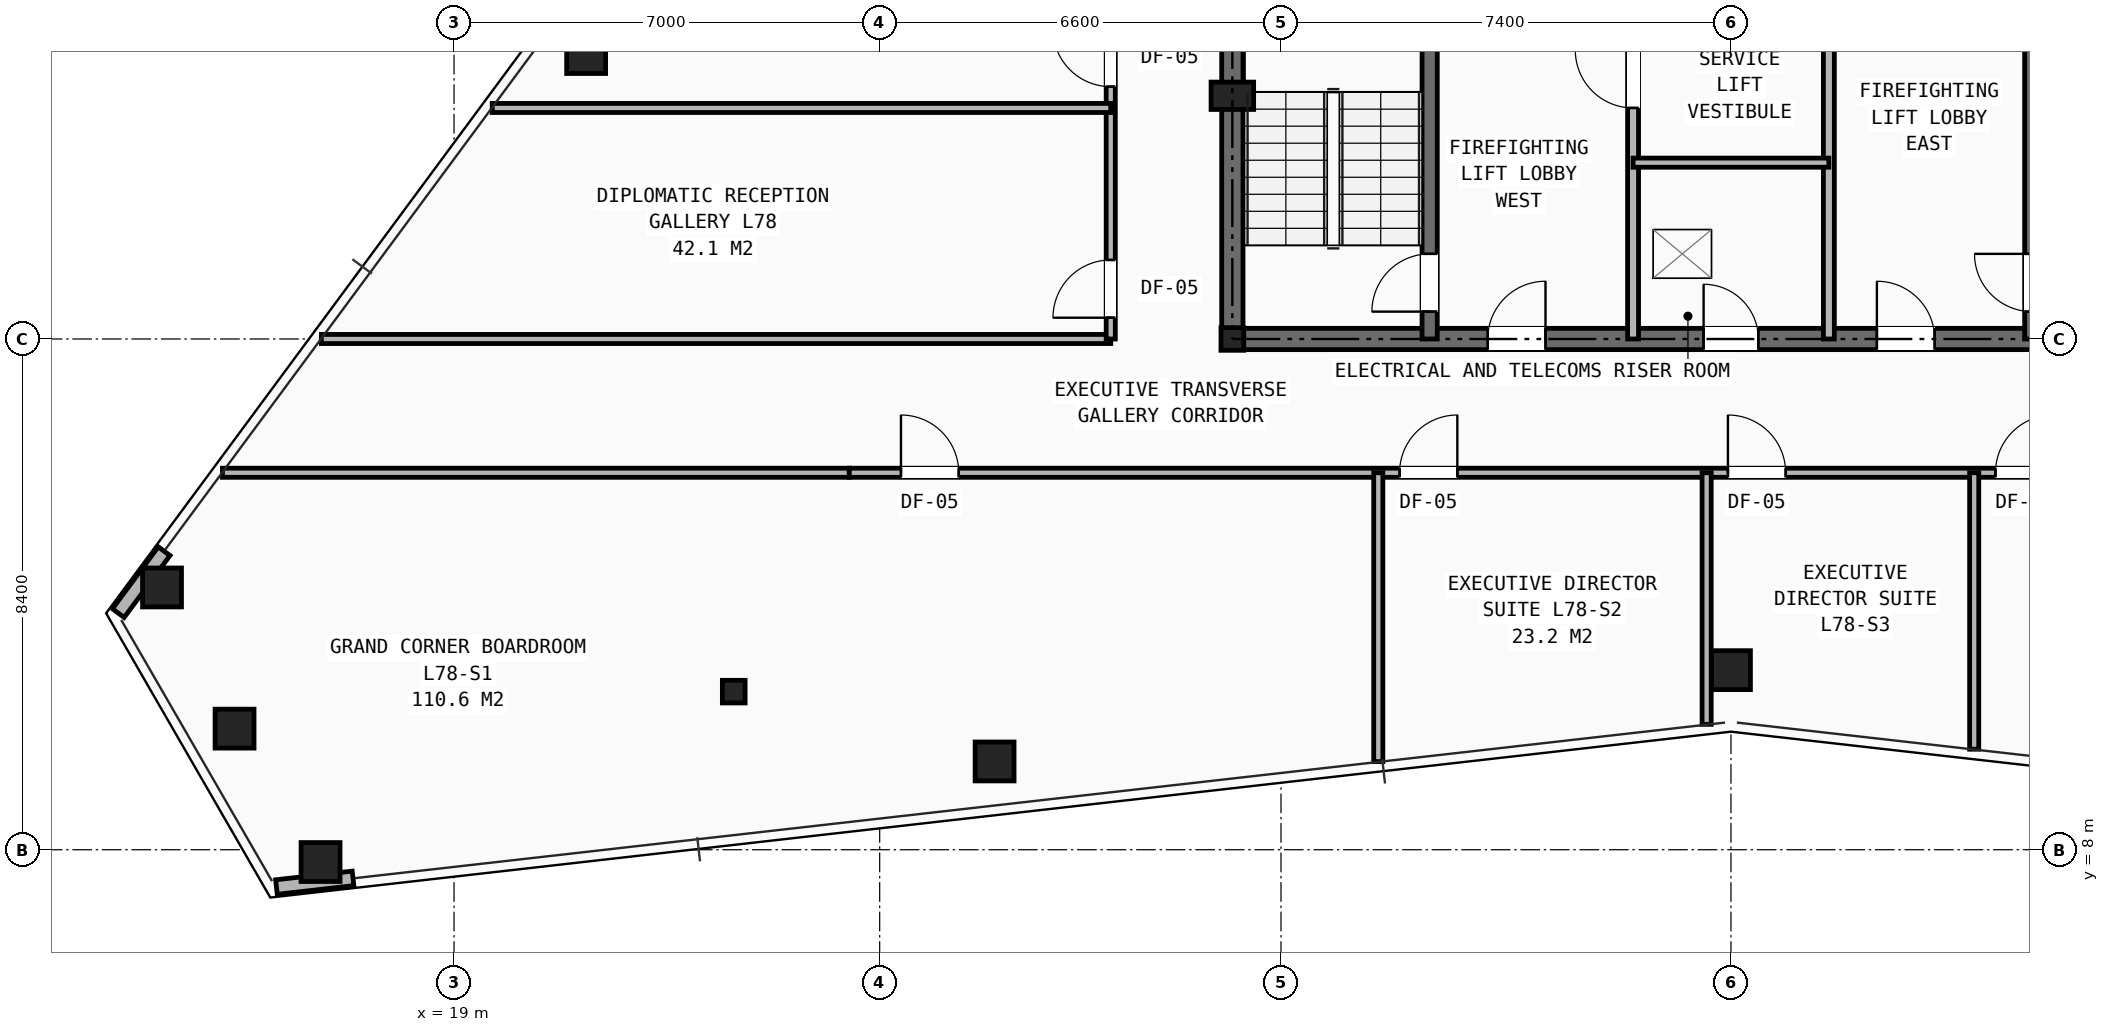
"""IFC4 building model, lengths in metres.
Left out: names, types, materials, properties, quantities, classifications, styles, units other than length and angle.
Written with IfcOpenShell. Run it as: python <this file> out.ifc"""

import sys

from ifc_helpers import new_model, si_unit, direction, frame, frame_2d, origin, origin_2d, place, context, subcontext, project, spatial, rectangle, hollow_rectangle, i_section, extrude, element, fill, save


model = new_model("IFC4")
c1 = context("Model", 3, precision=1e-05, world=origin(), true_north=direction((0.0, 1.0)))
c2 = subcontext(c1, "Body", "Model", "MODEL_VIEW")
j1 = project(units=[si_unit("LENGTHUNIT", "METRE"), si_unit("PLANEANGLEUNIT", "RADIAN")], contexts=[c1])
p1 = place(None, origin())
s1 = spatial("IfcSite", under=j1, at=p1, CompositionType="ELEMENT")
p2 = place(p1, origin())
s2 = spatial("IfcBuilding", under=s1, at=p2, CompositionType="ELEMENT")
p3 = place(p2, frame((0.0, 0.0, 276.0)))
s3 = spatial("IfcBuildingStorey", under=s2, at=p3, CompositionType="ELEMENT", Elevation=276.0)
for number, where, z_axis, x_axis in (
    (1, (31.8, 16.4, 0.0), (0.0, 0.0, 1.0), (1.0, 0.0, 0.0)),
    (2, (23.6, 10.6, 0.0), (0.0, 0.0, 1.0), (1.0, 0.0, 0.0)),
):
    element("IfcColumn", number, at=place(p3, frame(where, z_axis=z_axis, x_axis=x_axis)), inside=s3, PredefinedType="COLUMN", context=c2, shape_type="SweptSolid", body=[
        extrude(i_section(OverallWidth=0.374, OverallDepth=0.372, WebThickness=0.016, FlangeThickness=0.026, at=origin_2d()), origin(), (0.0, 0.0, 1.0), 3.5),
    ])
p4 = place(p3, frame((31.8, 20.4, 0.0), z_axis=(0.0, 0.0, 1.0), x_axis=(1.0, 0.0, 0.0)))
e3 = element("IfcColumn", 3, at=p4, inside=s3, PredefinedType="PILASTER", context=c2, shape_type="SweptSolid", body=[
    extrude(rectangle(XDim=0.7, YDim=0.45, at=origin_2d()), origin(), (0.0, 0.0, 1.0), 3.5),
])
for number, where, z_axis, x_axis in (
    (4, (21.173, 21.086, 0.0), (0.0, 0.0, 1.0), (1.0, 0.0, 0.0)),
    (5, (14.198, 12.313, 0.0), (0.0, 0.0, 1.0), (1.0, 0.0, 0.0)),
    (6, (15.39, 9.992, 0.0), (0.0, 0.0, 1.0), (1.0, 0.0, 0.0)),
    (7, (16.805, 7.798, 0.0), (0.0, 0.0, 1.0), (1.0, 0.0, 0.0)),
    (8, (27.89, 9.452, 0.0), (0.0, 0.0, 1.0), (1.0, 0.0, 0.0)),
    (9, (40.0, 10.953, 0.0), (0.0, 0.0, 1.0), (1.0, 0.0, 0.0)),
):
    element("IfcColumn", number, at=place(p3, frame(where, z_axis=z_axis, x_axis=x_axis)), inside=s3, PredefinedType="COLUMN", context=c2, shape_type="SweptSolid", body=[
        extrude(hollow_rectangle(XDim=0.64, YDim=0.64, WallThickness=0.045, at=origin_2d()), origin(), (0.0, 0.0, 1.0), 3.5),
    ])
p5 = place(p3, frame((14.232, 12.91, 0.0), z_axis=(0.0, 0.0, 1.0), x_axis=(-0.594499388503, -0.804096062091, 0.0)))
e10 = element("IfcWall", 10, at=p5, inside=s3, PredefinedType="SHEAR", context=c2, shape_type="SweptSolid", body=[
    extrude(rectangle(XDim=1.267, YDim=0.24, at=frame_2d((0.634, 0.0))), origin(), (0.0, 0.0, 1.0), 2.623),
])
p6 = place(p3, frame((16.079, 7.386, 0.0), z_axis=(0.0, 0.0, 1.0), x_axis=(0.993610655419, 0.11286215237, 0.0)))
e11 = element("IfcWall", 11, at=p6, inside=s3, PredefinedType="SHEAR", context=c2, shape_type="SweptSolid", body=[
    extrude(rectangle(XDim=1.268, YDim=0.24, at=frame_2d((0.634, 0.0))), origin(), (0.0, 0.0, 1.0), 2.623),
])
p7 = place(p3, frame((31.8, 16.4, 0.0), z_axis=(0.0, 0.0, 1.0), x_axis=(1.0, 0.0, 0.0)))
e12 = element("IfcWall", 12, at=p7, inside=s3, PredefinedType="SHEAR", context=c2, shape_type="SweptSolid", body=[
    extrude(rectangle(XDim=16.4, YDim=0.35, at=frame_2d((8.2, 0.0))), origin(), (0.0, 0.0, 1.0), 3.25),
])
p8 = place(p7, frame((7.75, 0.0, 0.0)))
e13 = element("IfcOpeningElement", 13, at=p8, cuts=e12, PredefinedType="OPENING", context=c2, shape_type="SweptSolid", body=[
    extrude(rectangle(XDim=0.9, YDim=2.1, at=frame_2d((0.45, 1.05))), frame((0.0, 0.185, 0.0), z_axis=(0.0, -1.0, 0.0), x_axis=(1.0, 0.0, 0.0)), (0.0, 0.0, 1.0), 0.37),
])
p9 = place(p7, frame((4.2, 0.0, 0.0)))
e14 = element("IfcOpeningElement", 14, at=p9, cuts=e12, PredefinedType="OPENING", context=c2, shape_type="SweptSolid", body=[
    extrude(rectangle(XDim=0.95, YDim=2.1, at=frame_2d((0.475, 1.05))), frame((0.0, 0.185, 0.0), z_axis=(0.0, -1.0, 0.0), x_axis=(1.0, 0.0, 0.0)), (0.0, 0.0, 1.0), 0.37),
])
p10 = place(p7, frame((10.6, 0.0, 0.0)))
e15 = element("IfcOpeningElement", 15, at=p10, cuts=e12, PredefinedType="OPENING", context=c2, shape_type="SweptSolid", body=[
    extrude(rectangle(XDim=0.95, YDim=2.1, at=frame_2d((0.475, 1.05))), frame((0.0, 0.185, 0.0), z_axis=(0.0, -1.0, 0.0), x_axis=(1.0, 0.0, 0.0)), (0.0, 0.0, 1.0), 0.37),
])
p11 = place(p3, frame((31.8, 16.4, 0.0), z_axis=(0.0, 0.0, 1.0), x_axis=(0.0, 1.0, 0.0)))
e16 = element("IfcWall", 16, at=p11, inside=s3, PredefinedType="SHEAR", context=c2, shape_type="SweptSolid", body=[
    extrude(rectangle(XDim=14.8, YDim=0.35, at=frame_2d((7.4, 0.0))), origin(), (0.0, 0.0, 1.0), 3.25),
])
p12 = place(p11, frame((11.0, 0.0, 0.0)))
e17 = element("IfcOpeningElement", 17, at=p12, cuts=e16, PredefinedType="OPENING", context=c2, shape_type="SweptSolid", body=[
    extrude(rectangle(XDim=1.1, YDim=2.15, at=frame_2d((0.55, 1.075))), frame((0.0, 0.185, 0.0), z_axis=(0.0, -1.0, 0.0), x_axis=(1.0, 0.0, 0.0)), (0.0, 0.0, 1.0), 0.37),
])
p13 = place(p3, frame((35.045, 16.4, 0.0), z_axis=(0.0, 0.0, 1.0), x_axis=(0.0, 1.0, 0.0)))
e18 = element("IfcWall", 18, at=p13, inside=s3, PredefinedType="SHEAR", context=c2, shape_type="SweptSolid", body=[
    extrude(rectangle(XDim=8.4, YDim=0.25, at=frame_2d((4.2, 0.0))), origin(), (0.0, 0.0, 1.0), 3.25),
])
p14 = place(p13, frame((0.45, 0.0, 0.0)))
e19 = element("IfcOpeningElement", 19, at=p14, cuts=e18, PredefinedType="OPENING", context=c2, shape_type="SweptSolid", body=[
    extrude(rectangle(XDim=0.95, YDim=2.1, at=frame_2d((0.475, 1.05))), frame((0.0, 0.135, 0.0), z_axis=(0.0, -1.0, 0.0), x_axis=(1.0, 0.0, 0.0)), (0.0, 0.0, 1.0), 0.27),
])
p15 = place(p3, frame((44.955, 16.4, 0.0), z_axis=(0.0, 0.0, 1.0), x_axis=(0.0, 1.0, 0.0)))
e20 = element("IfcWall", 20, at=p15, inside=s3, PredefinedType="SHEAR", context=c2, shape_type="SweptSolid", body=[
    extrude(rectangle(XDim=8.4, YDim=0.25, at=frame_2d((4.2, 0.0))), origin(), (0.0, 0.0, 1.0), 3.25),
])
p16 = place(p15, frame((0.45, 0.0, 0.0)))
e21 = element("IfcOpeningElement", 21, at=p16, cuts=e20, PredefinedType="OPENING", context=c2, shape_type="SweptSolid", body=[
    extrude(rectangle(XDim=0.95, YDim=2.1, at=frame_2d((0.475, 1.05))), frame((0.0, 0.135, 0.0), z_axis=(0.0, -1.0, 0.0), x_axis=(1.0, 0.0, 0.0)), (0.0, 0.0, 1.0), 0.27),
])
p17 = place(p3, frame((38.39, 16.4, 0.0), z_axis=(0.0, 0.0, 1.0), x_axis=(0.0, 1.0, 0.0)))
e22 = element("IfcWall", 22, at=p17, inside=s3, PredefinedType="PARTITIONING", context=c2, shape_type="SweptSolid", body=[
    extrude(rectangle(XDim=8.4, YDim=0.18, at=frame_2d((4.2, 0.0))), origin(), (0.0, 0.0, 1.0), 2.705),
])
p18 = place(p17, frame((3.8, 0.0, 0.0)))
e23 = element("IfcOpeningElement", 23, at=p18, cuts=e22, PredefinedType="OPENING", context=c2, shape_type="SweptSolid", body=[
    extrude(rectangle(XDim=0.95, YDim=2.1, at=frame_2d((0.475, 1.05))), frame((0.0, 0.1, 0.0), z_axis=(0.0, -1.0, 0.0), x_axis=(1.0, 0.0, 0.0)), (0.0, 0.0, 1.0), 0.2),
])
p19 = place(p3, frame((41.61, 16.4, 0.0), z_axis=(0.0, 0.0, 1.0), x_axis=(0.0, 1.0, 0.0)))
e24 = element("IfcWall", 24, at=p19, inside=s3, PredefinedType="PARTITIONING", context=c2, shape_type="SweptSolid", body=[
    extrude(rectangle(XDim=8.4, YDim=0.18, at=frame_2d((4.2, 0.0))), origin(), (0.0, 0.0, 1.0), 2.705),
])
p20 = place(p3, frame((38.39, 19.3, 0.0), z_axis=(0.0, 0.0, 1.0), x_axis=(1.0, 0.0, 0.0)))
e25 = element("IfcWall", 25, at=p20, inside=s3, PredefinedType="PARTITIONING", context=c2, shape_type="SweptSolid", body=[
    extrude(rectangle(XDim=3.22, YDim=0.15, at=frame_2d((1.61, 0.0))), origin(), (0.0, 0.0, 1.0), 3.25),
])
p21 = place(p3, frame((15.192, 14.2, 0.0), z_axis=(0.0, 0.0, 1.0), x_axis=(1.0, 0.0, 0.0)))
e26 = element("IfcWall", 26, at=p21, inside=s3, PredefinedType="PARTITIONING", context=c2, shape_type="SweptSolid", body=[
    extrude(rectangle(XDim=10.308, YDim=0.15, at=frame_2d((5.154, 0.0))), origin(), (0.0, 0.0, 1.0), 2.292),
])
p22 = place(p3, frame((16.818, 16.4, 0.0), z_axis=(0.0, 0.0, 1.0), x_axis=(1.0, 0.0, 0.0)))
e27 = element("IfcWall", 27, at=p22, inside=s3, PredefinedType="PARTITIONING", context=c2, shape_type="SweptSolid", body=[
    extrude(rectangle(XDim=12.982, YDim=0.15, at=frame_2d((6.491, 0.0))), origin(), (0.0, 0.0, 1.0), 2.292),
])
p23 = place(p3, frame((29.8, 16.4, 0.0), z_axis=(0.0, 0.0, 1.0), x_axis=(0.0, 1.0, 0.0)))
e28 = element("IfcWall", 28, at=p23, inside=s3, PredefinedType="PARTITIONING", context=c2, shape_type="SweptSolid", body=[
    extrude(rectangle(XDim=19.3, YDim=0.15, at=frame_2d((9.65, 0.0))), origin(), (0.0, 0.0, 1.0), 2.292),
])
p24 = place(p23, frame((0.35, 0.0, 0.0)))
e29 = element("IfcOpeningElement", 29, at=p24, cuts=e28, PredefinedType="OPENING", context=c2, shape_type="SweptSolid", body=[
    extrude(rectangle(XDim=0.95, YDim=2.1, at=frame_2d((0.475, 1.05))), frame((0.0, 0.085, 0.0), z_axis=(0.0, -1.0, 0.0), x_axis=(1.0, 0.0, 0.0)), (0.0, 0.0, 1.0), 0.17),
])
p25 = place(p23, frame((4.15, 0.0, 0.0)))
e30 = element("IfcOpeningElement", 30, at=p25, cuts=e28, PredefinedType="OPENING", context=c2, shape_type="SweptSolid", body=[
    extrude(rectangle(XDim=0.95, YDim=2.1, at=frame_2d((0.475, 1.05))), frame((0.0, 0.085, 0.0), z_axis=(0.0, -1.0, 0.0), x_axis=(1.0, 0.0, 0.0)), (0.0, 0.0, 1.0), 0.17),
])
p26 = place(p23, frame((9.45, 0.0, 0.0)))
e31 = element("IfcOpeningElement", 31, at=p26, cuts=e28, PredefinedType="OPENING", context=c2, shape_type="SweptSolid", body=[
    extrude(rectangle(XDim=0.95, YDim=2.1, at=frame_2d((0.475, 1.05))), frame((0.0, 0.085, 0.0), z_axis=(0.0, -1.0, 0.0), x_axis=(1.0, 0.0, 0.0)), (0.0, 0.0, 1.0), 0.17),
])
p27 = place(p3, frame((25.5, 14.2, 0.0), z_axis=(0.0, 0.0, 1.0), x_axis=(1.0, 0.0, 0.0)))
e32 = element("IfcWall", 32, at=p27, inside=s3, PredefinedType="PARTITIONING", context=c2, shape_type="SweptSolid", body=[
    extrude(rectangle(XDim=29.0, YDim=0.15, at=frame_2d((14.5, 0.0))), origin(), (0.0, 0.0, 1.0), 2.292),
])
p28 = place(p27, frame((0.85, 0.0, 0.0)))
e33 = element("IfcOpeningElement", 33, at=p28, cuts=e32, PredefinedType="OPENING", context=c2, shape_type="SweptSolid", body=[
    extrude(rectangle(XDim=0.95, YDim=2.1, at=frame_2d((0.475, 1.05))), frame((0.0, 0.085, 0.0), z_axis=(0.0, -1.0, 0.0), x_axis=(1.0, 0.0, 0.0)), (0.0, 0.0, 1.0), 0.17),
])
p29 = place(p27, frame((9.05, 0.0, 0.0)))
e34 = element("IfcOpeningElement", 34, at=p29, cuts=e32, PredefinedType="OPENING", context=c2, shape_type="SweptSolid", body=[
    extrude(rectangle(XDim=0.95, YDim=2.1, at=frame_2d((0.475, 1.05))), frame((0.0, 0.085, 0.0), z_axis=(0.0, -1.0, 0.0), x_axis=(1.0, 0.0, 0.0)), (0.0, 0.0, 1.0), 0.17),
])
p30 = place(p27, frame((14.45, 0.0, 0.0)))
e35 = element("IfcOpeningElement", 35, at=p30, cuts=e32, PredefinedType="OPENING", context=c2, shape_type="SweptSolid", body=[
    extrude(rectangle(XDim=0.95, YDim=2.1, at=frame_2d((0.475, 1.05))), frame((0.0, 0.085, 0.0), z_axis=(0.0, -1.0, 0.0), x_axis=(1.0, 0.0, 0.0)), (0.0, 0.0, 1.0), 0.17),
])
p31 = place(p27, frame((18.85, 0.0, 0.0)))
e36 = element("IfcOpeningElement", 36, at=p31, cuts=e32, PredefinedType="OPENING", context=c2, shape_type="SweptSolid", body=[
    extrude(rectangle(XDim=0.95, YDim=2.1, at=frame_2d((0.475, 1.05))), frame((0.0, 0.085, 0.0), z_axis=(0.0, -1.0, 0.0), x_axis=(1.0, 0.0, 0.0)), (0.0, 0.0, 1.0), 0.17),
])
p32 = place(p3, frame((34.2, 9.449, 0.0), z_axis=(0.0, 0.0, 1.0), x_axis=(0.0, 1.0, 0.0)))
e37 = element("IfcWall", 37, at=p32, inside=s3, PredefinedType="PARTITIONING", context=c2, shape_type="SweptSolid", body=[
    extrude(rectangle(XDim=4.751, YDim=0.15, at=frame_2d((2.375, 0.0))), origin(), (0.0, 0.0, 1.0), 2.628),
])
p33 = place(p3, frame((39.6, 10.062, 0.0), z_axis=(0.0, 0.0, 1.0), x_axis=(0.0, 1.0, 0.0)))
e38 = element("IfcWall", 38, at=p33, inside=s3, PredefinedType="PARTITIONING", context=c2, shape_type="SweptSolid", body=[
    extrude(rectangle(XDim=4.138, YDim=0.15, at=frame_2d((2.069, 0.0))), origin(), (0.0, 0.0, 1.0), 2.292),
])
p34 = place(p3, frame((44.0, 9.653, 0.0), z_axis=(0.0, 0.0, 1.0), x_axis=(0.0, 1.0, 0.0)))
e39 = element("IfcWall", 39, at=p34, inside=s3, PredefinedType="PARTITIONING", context=c2, shape_type="SweptSolid", body=[
    extrude(rectangle(XDim=4.547, YDim=0.15, at=frame_2d((2.273, 0.0))), origin(), (0.0, 0.0, 1.0), 2.628),
])
p35 = place(p3, frame((19.628, 20.2, 0.0), z_axis=(0.0, 0.0, 1.0), x_axis=(1.0, 0.0, 0.0)))
e40 = element("IfcWall", 40, at=p35, inside=s3, PredefinedType="PARTITIONING", context=c2, shape_type="SweptSolid", body=[
    extrude(rectangle(XDim=10.172, YDim=0.15, at=frame_2d((5.086, 0.0))), origin(), (0.0, 0.0, 1.0), 2.292),
])
p36 = place(p8, origin())
e41 = element("IfcDoor", 41, at=p36, inside=s3, OperationType="SINGLE_SWING_LEFT", PredefinedType="DOOR", context=c2, shape_type="SweptSolid", body=[
    extrude(rectangle(XDim=0.9, YDim=2.1, at=frame_2d((0.45, 1.05))), frame((0.0, 0.025, 0.0), z_axis=(0.0, -1.0, 0.0), x_axis=(1.0, 0.0, 0.0)), (0.0, 0.0, 1.0), 0.05),
])
fill(e13, e41)
p37 = place(p18, origin())
e42 = element("IfcDoor", 42, at=p37, inside=s3, OperationType="SINGLE_SWING_RIGHT", PredefinedType="DOOR", context=c2, shape_type="SweptSolid", body=[
    extrude(rectangle(XDim=0.95, YDim=2.1, at=frame_2d((0.475, 1.05))), frame((0.0, 0.025, 0.0), z_axis=(0.0, -1.0, 0.0), x_axis=(1.0, 0.0, 0.0)), (0.0, 0.0, 1.0), 0.05),
])
fill(e23, e42)
p38 = place(p14, origin())
e43 = element("IfcDoor", 43, at=p38, inside=s3, OperationType="SINGLE_SWING_LEFT", PredefinedType="DOOR", context=c2, shape_type="SweptSolid", body=[
    extrude(rectangle(XDim=0.95, YDim=2.1, at=frame_2d((0.475, 1.05))), frame((0.0, 0.025, 0.0), z_axis=(0.0, -1.0, 0.0), x_axis=(1.0, 0.0, 0.0)), (0.0, 0.0, 1.0), 0.05),
])
fill(e19, e43)
p39 = place(p9, origin())
e44 = element("IfcDoor", 44, at=p39, inside=s3, OperationType="SINGLE_SWING_RIGHT", PredefinedType="DOOR", context=c2, shape_type="SweptSolid", body=[
    extrude(rectangle(XDim=0.95, YDim=2.1, at=frame_2d((0.475, 1.05))), frame((0.0, 0.025, 0.0), z_axis=(0.0, -1.0, 0.0), x_axis=(1.0, 0.0, 0.0)), (0.0, 0.0, 1.0), 0.05),
])
fill(e14, e44)
p40 = place(p10, origin())
e45 = element("IfcDoor", 45, at=p40, inside=s3, OperationType="SINGLE_SWING_LEFT", PredefinedType="DOOR", context=c2, shape_type="SweptSolid", body=[
    extrude(rectangle(XDim=0.95, YDim=2.1, at=frame_2d((0.475, 1.05))), frame((0.0, 0.025, 0.0), z_axis=(0.0, -1.0, 0.0), x_axis=(1.0, 0.0, 0.0)), (0.0, 0.0, 1.0), 0.05),
])
fill(e15, e45)
p41 = place(p28, origin())
e46 = element("IfcDoor", 46, at=p41, inside=s3, OperationType="SINGLE_SWING_LEFT", PredefinedType="DOOR", context=c2, shape_type="SweptSolid", body=[
    extrude(rectangle(XDim=0.95, YDim=2.1, at=frame_2d((0.475, 1.05))), frame((0.0, 0.025, 0.0), z_axis=(0.0, -1.0, 0.0), x_axis=(1.0, 0.0, 0.0)), (0.0, 0.0, 1.0), 0.05),
])
fill(e33, e46)
p42 = place(p29, origin())
e47 = element("IfcDoor", 47, at=p42, inside=s3, OperationType="SINGLE_SWING_RIGHT", PredefinedType="DOOR", context=c2, shape_type="SweptSolid", body=[
    extrude(rectangle(XDim=0.95, YDim=2.1, at=frame_2d((0.475, 1.05))), frame((0.0, 0.025, 0.0), z_axis=(0.0, -1.0, 0.0), x_axis=(1.0, 0.0, 0.0)), (0.0, 0.0, 1.0), 0.05),
])
fill(e34, e47)
p43 = place(p30, origin())
e48 = element("IfcDoor", 48, at=p43, inside=s3, OperationType="SINGLE_SWING_LEFT", PredefinedType="DOOR", context=c2, shape_type="SweptSolid", body=[
    extrude(rectangle(XDim=0.95, YDim=2.1, at=frame_2d((0.475, 1.05))), frame((0.0, 0.025, 0.0), z_axis=(0.0, -1.0, 0.0), x_axis=(1.0, 0.0, 0.0)), (0.0, 0.0, 1.0), 0.05),
])
fill(e35, e48)
p44 = place(p31, origin())
e49 = element("IfcDoor", 49, at=p44, inside=s3, OperationType="SINGLE_SWING_RIGHT", PredefinedType="DOOR", context=c2, shape_type="SweptSolid", body=[
    extrude(rectangle(XDim=0.95, YDim=2.1, at=frame_2d((0.475, 1.05))), frame((0.0, 0.025, 0.0), z_axis=(0.0, -1.0, 0.0), x_axis=(1.0, 0.0, 0.0)), (0.0, 0.0, 1.0), 0.05),
])
fill(e36, e49)
p45 = place(p24, origin())
e50 = element("IfcDoor", 50, at=p45, inside=s3, OperationType="SINGLE_SWING_LEFT", PredefinedType="DOOR", context=c2, shape_type="SweptSolid", body=[
    extrude(rectangle(XDim=0.95, YDim=2.1, at=frame_2d((0.475, 1.05))), frame((0.0, 0.025, 0.0), z_axis=(0.0, -1.0, 0.0), x_axis=(1.0, 0.0, 0.0)), (0.0, 0.0, 1.0), 0.05),
])
fill(e29, e50)
p46 = place(p25, origin())
e51 = element("IfcDoor", 51, at=p46, inside=s3, OperationType="SINGLE_SWING_RIGHT", PredefinedType="DOOR", context=c2, shape_type="SweptSolid", body=[
    extrude(rectangle(XDim=0.95, YDim=2.1, at=frame_2d((0.475, 1.05))), frame((0.0, 0.025, 0.0), z_axis=(0.0, -1.0, 0.0), x_axis=(1.0, 0.0, 0.0)), (0.0, 0.0, 1.0), 0.05),
])
fill(e30, e51)
save(model, sys.argv[1])
